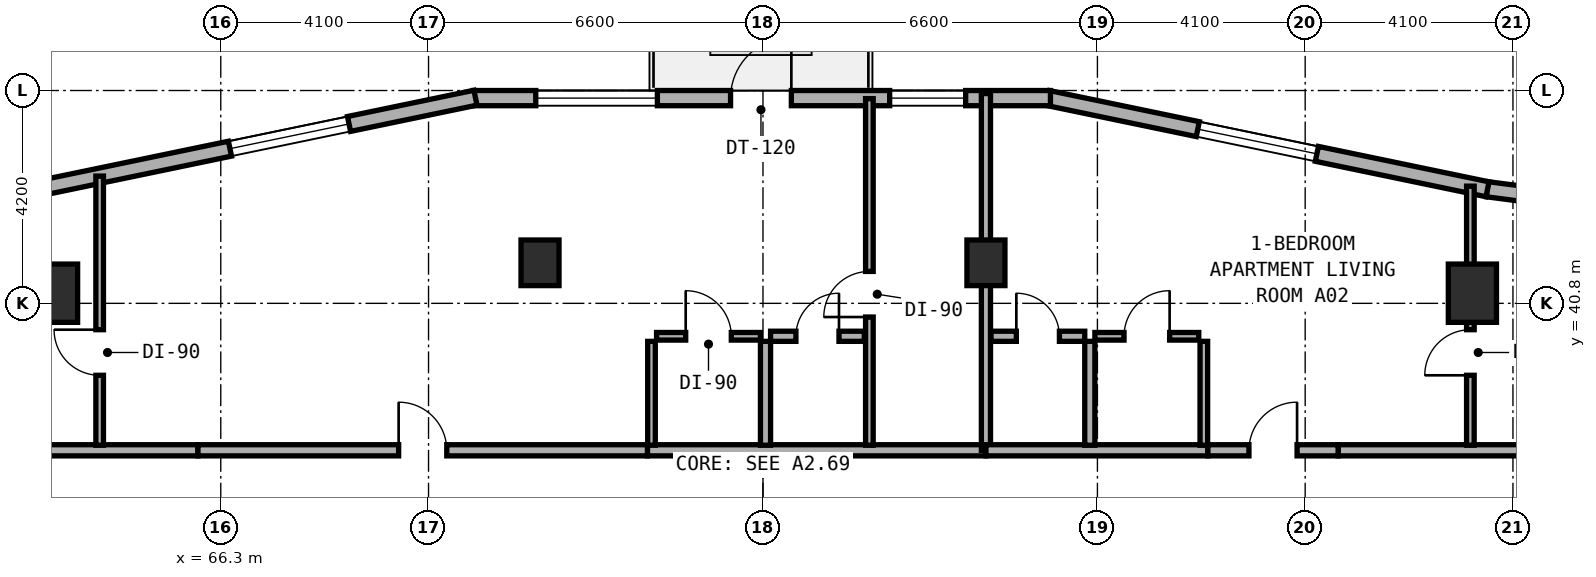
"""IFC4 building model, lengths in metres.
Left out: names, types, materials, properties, quantities, classifications, styles, units other than length and angle.
Written with IfcOpenShell. Run it as: python <this file> out.ifc"""

import sys

from ifc_helpers import new_model, si_unit, direction, frame, frame_2d, origin, origin_2d, place, context, subcontext, project, spatial, rectangle, extrude, element, fill, save


model = new_model("IFC4")
c1 = context("Model", 3, precision=1e-05, world=origin(), true_north=direction((0.0, 1.0)))
c2 = subcontext(c1, "Body", "Model", "MODEL_VIEW")
j1 = project(units=[si_unit("LENGTHUNIT", "METRE"), si_unit("PLANEANGLEUNIT", "RADIAN")], contexts=[c1])
p1 = place(None, origin())
s1 = spatial("IfcSite", under=j1, at=p1, CompositionType="ELEMENT")
p2 = place(p1, origin())
s2 = spatial("IfcBuilding", under=s1, at=p2, CompositionType="ELEMENT")
p3 = place(p2, frame((0.0, 0.0, 69.5)))
s3 = spatial("IfcBuildingStorey", under=s2, at=p3, CompositionType="ELEMENT", Elevation=69.5)
for number, where, z_axis, x_axis in (
    (1, (72.6, 41.6, 0.0), (0.0, 0.0, 1.0), (1.0, 0.0, 0.0)),
    (2, (81.4, 41.6, 0.0), (0.0, 0.0, 1.0), (1.0, 0.0, 0.0)),
):
    element("IfcColumn", number, at=place(p3, frame(where, z_axis=z_axis, x_axis=x_axis)), inside=s3, PredefinedType="COLUMN", context=c2, shape_type="SweptSolid", body=[
        extrude(rectangle(XDim=0.75, YDim=0.9, at=origin_2d()), origin(), (0.0, 0.0, 1.0), 3.5),
    ])
for number, where, z_axis, x_axis in (
    (3, (91.0, 41.0, 0.0), (0.0, 0.0, 1.0), (1.0, 0.0, 0.0)),
    (4, (63.0, 41.0, 0.0), (0.0, 0.0, 1.0), (1.0, 0.0, 0.0)),
):
    element("IfcColumn", number, at=place(p3, frame(where, z_axis=z_axis, x_axis=x_axis)), inside=s3, PredefinedType="COLUMN", context=c2, shape_type="SweptSolid", body=[
        extrude(rectangle(XDim=0.95, YDim=1.15, at=origin_2d()), origin(), (0.0, 0.0, 1.0), 3.5),
    ])
p4 = place(p3, frame((92.051, 42.953, 0.0), z_axis=(0.0, 0.0, 1.0), x_axis=(-0.991559404866, 0.129653178221, 0.0)))
e5 = element("IfcWall", 5, at=p4, inside=s3, PredefinedType="STANDARD", context=c2, shape_type="SweptSolid", body=[
    extrude(rectangle(XDim=0.764, YDim=0.3, at=frame_2d((0.382, 0.0))), origin(), (0.0, 0.0, 1.0), 3.25),
])
p5 = place(p3, frame((91.298, 43.051, 0.0), z_axis=(0.0, 0.0, 1.0), x_axis=(-0.979120793441, 0.203279295189, 0.0)))
e6 = element("IfcWall", 6, at=p5, inside=s3, PredefinedType="STANDARD", context=c2, shape_type="SweptSolid", body=[
    extrude(rectangle(XDim=8.855, YDim=0.3, at=frame_2d((4.427, 0.0))), origin(), (0.0, 0.0, 1.0), 3.25),
])
p6 = place(p5, frame((3.439, 0.0, 0.8)))
e7 = element("IfcOpeningElement", 7, at=p6, cuts=e6, PredefinedType="OPENING", context=c2, shape_type="SweptSolid", body=[
    extrude(rectangle(XDim=2.4, YDim=1.6, at=frame_2d((1.2, 0.8))), frame((0.0, 0.16, 0.0), z_axis=(0.0, -1.0, 0.0), x_axis=(1.0, 0.0, 0.0)), (0.0, 0.0, 1.0), 0.32),
])
p7 = place(p3, frame((82.673, 44.85, 0.0), z_axis=(0.0, 0.0, 1.0), x_axis=(-1.0, 0.0, 0.0)))
e8 = element("IfcWall", 8, at=p7, inside=s3, PredefinedType="STANDARD", context=c2, shape_type="SweptSolid", body=[
    extrude(rectangle(XDim=11.391, YDim=0.3, at=frame_2d((5.696, 0.0))), origin(), (0.0, 0.0, 1.0), 3.25),
])
p8 = place(p7, frame((5.113, 0.0, 0.0)))
e9 = element("IfcOpeningElement", 9, at=p8, cuts=e8, PredefinedType="OPENING", context=c2, shape_type="SweptSolid", body=[
    extrude(rectangle(XDim=1.2, YDim=2.15, at=frame_2d((0.6, 1.075))), frame((0.0, 0.16, 0.0), z_axis=(0.0, -1.0, 0.0), x_axis=(1.0, 0.0, 0.0)), (0.0, 0.0, 1.0), 0.32),
])
p9 = place(p7, frame((1.673, 0.0, 0.85)))
e10 = element("IfcOpeningElement", 10, at=p9, cuts=e8, PredefinedType="OPENING", context=c2, shape_type="SweptSolid", body=[
    extrude(rectangle(XDim=1.5, YDim=1.5, at=frame_2d((0.75, 0.75))), frame((0.0, 0.16, 0.0), z_axis=(0.0, -1.0, 0.0), x_axis=(1.0, 0.0, 0.0)), (0.0, 0.0, 1.0), 0.32),
])
p10 = place(p7, frame((7.757, 0.0, 0.8)))
e11 = element("IfcOpeningElement", 11, at=p10, cuts=e8, PredefinedType="OPENING", context=c2, shape_type="SweptSolid", body=[
    extrude(rectangle(XDim=2.4, YDim=1.6, at=frame_2d((1.2, 0.8))), frame((0.0, 0.16, 0.0), z_axis=(0.0, -1.0, 0.0), x_axis=(1.0, 0.0, 0.0)), (0.0, 0.0, 1.0), 0.32),
])
p11 = place(p3, frame((71.326, 44.858, 0.0), z_axis=(0.0, 0.0, 1.0), x_axis=(-0.979124350489, -0.203262161453, 0.0)))
e12 = element("IfcWall", 12, at=p11, inside=s3, PredefinedType="STANDARD", context=c2, shape_type="SweptSolid", body=[
    extrude(rectangle(XDim=8.889, YDim=0.3, at=frame_2d((4.445, 0.0))), origin(), (0.0, 0.0, 1.0), 3.25),
])
p12 = place(p11, frame((2.548, 0.0, 0.8)))
e13 = element("IfcOpeningElement", 13, at=p12, cuts=e12, PredefinedType="OPENING", context=c2, shape_type="SweptSolid", body=[
    extrude(rectangle(XDim=2.4, YDim=1.6, at=frame_2d((1.2, 0.8))), frame((0.0, 0.16, 0.0), z_axis=(0.0, -1.0, 0.0), x_axis=(1.0, 0.0, 0.0)), (0.0, 0.0, 1.0), 0.32),
])
p13 = place(p3, frame((58.16, 37.9, 0.0), z_axis=(0.0, 0.0, 1.0), x_axis=(1.0, 0.0, 0.0)))
e14 = element("IfcWall", 14, at=p13, inside=s3, PredefinedType="SOLIDWALL", context=c2, shape_type="SweptSolid", body=[
    extrude(rectangle(XDim=7.69, YDim=0.22, at=frame_2d((3.845, 0.0))), origin(), (0.0, 0.0, 1.0), 2.865),
])
p14 = place(p3, frame((74.72, 37.9, 0.0), z_axis=(0.0, 0.0, 1.0), x_axis=(1.0, 0.0, 0.0)))
e15 = element("IfcWall", 15, at=p14, inside=s3, PredefinedType="SOLIDWALL", context=c2, shape_type="SweptSolid", body=[
    extrude(rectangle(XDim=6.68, YDim=0.22, at=frame_2d((3.34, 0.0))), origin(), (0.0, 0.0, 1.0), 2.725),
])
p15 = place(p3, frame((65.85, 37.9, 0.0), z_axis=(0.0, 0.0, 1.0), x_axis=(1.0, 0.0, 0.0)))
e16 = element("IfcWall", 16, at=p15, inside=s3, PredefinedType="SOLIDWALL", context=c2, shape_type="SweptSolid", body=[
    extrude(rectangle(XDim=8.87, YDim=0.22, at=frame_2d((4.435, 0.0))), origin(), (0.0, 0.0, 1.0), 2.725),
])
p16 = place(p15, frame((3.96, 0.0, 0.0)))
e17 = element("IfcOpeningElement", 17, at=p16, cuts=e16, PredefinedType="OPENING", context=c2, shape_type="SweptSolid", body=[
    extrude(rectangle(XDim=0.95, YDim=2.1, at=frame_2d((0.475, 1.05))), frame((0.0, 0.12, 0.0), z_axis=(0.0, -1.0, 0.0), x_axis=(1.0, 0.0, 0.0)), (0.0, 0.0, 1.0), 0.24),
])
p17 = place(p3, frame((63.91, 38.0, 0.0), z_axis=(0.0, 0.0, 1.0), x_axis=(0.0, 1.0, 0.0)))
e18 = element("IfcWall", 18, at=p17, inside=s3, PredefinedType="PARTITIONING", context=c2, shape_type="SweptSolid", body=[
    extrude(rectangle(XDim=5.311, YDim=0.15, at=frame_2d((2.656, 0.0))), origin(), (0.0, 0.0, 1.0), 2.865),
])
p18 = place(p17, frame((1.38, 0.0, 0.0)))
e19 = element("IfcOpeningElement", 19, at=p18, cuts=e18, PredefinedType="OPENING", context=c2, shape_type="SweptSolid", body=[
    extrude(rectangle(XDim=0.9, YDim=2.1, at=frame_2d((0.45, 1.05))), frame((0.0, 0.085, 0.0), z_axis=(0.0, -1.0, 0.0), x_axis=(1.0, 0.0, 0.0)), (0.0, 0.0, 1.0), 0.17),
])
p19 = place(p3, frame((79.1, 38.0, 0.0), z_axis=(0.0, 0.0, 1.0), x_axis=(0.0, 1.0, 0.0)))
e20 = element("IfcWall", 20, at=p19, inside=s3, PredefinedType="PARTITIONING", context=c2, shape_type="SweptSolid", body=[
    extrude(rectangle(XDim=6.84, YDim=0.15, at=frame_2d((3.42, 0.0))), origin(), (0.0, 0.0, 1.0), 2.865),
])
p20 = place(p19, frame((2.53, 0.0, 0.0)))
e21 = element("IfcOpeningElement", 21, at=p20, cuts=e20, PredefinedType="OPENING", context=c2, shape_type="SweptSolid", body=[
    extrude(rectangle(XDim=0.9, YDim=2.1, at=frame_2d((0.45, 1.05))), frame((0.0, 0.085, 0.0), z_axis=(0.0, -1.0, 0.0), x_axis=(1.0, 0.0, 0.0)), (0.0, 0.0, 1.0), 0.17),
])
p21 = place(p3, frame((77.05, 38.0, 0.0), z_axis=(0.0, 0.0, 1.0), x_axis=(0.0, 1.0, 0.0)))
e22 = element("IfcWall", 22, at=p21, inside=s3, PredefinedType="PLUMBINGWALL", context=c2, shape_type="SweptSolid", body=[
    extrude(rectangle(XDim=2.05, YDim=0.2, at=frame_2d((1.025, 0.0))), origin(), (0.0, 0.0, 1.0), 2.955),
])
p22 = place(p3, frame((74.8, 38.0, 0.0), z_axis=(0.0, 0.0, 1.0), x_axis=(0.0, 1.0, 0.0)))
e23 = element("IfcWall", 23, at=p22, inside=s3, PredefinedType="PARTITIONING", context=c2, shape_type="SweptSolid", body=[
    extrude(rectangle(XDim=2.05, YDim=0.15, at=frame_2d((1.025, 0.0))), origin(), (0.0, 0.0, 1.0), 2.955),
])
p23 = place(p3, frame((77.15, 40.15, 0.0), z_axis=(0.0, 0.0, 1.0), x_axis=(1.0, 0.0, 0.0)))
e24 = element("IfcWall", 24, at=p23, inside=s3, PredefinedType="PLUMBINGWALL", context=c2, shape_type="SweptSolid", body=[
    extrude(rectangle(XDim=1.85, YDim=0.2, at=frame_2d((0.925, 0.0))), origin(), (0.0, 0.0, 1.0), 3.22),
])
p24 = place(p23, frame((0.5, 0.0, 0.0)))
e25 = element("IfcOpeningElement", 25, at=p24, cuts=e24, PredefinedType="OPENING", context=c2, shape_type="SweptSolid", body=[
    extrude(rectangle(XDim=0.85, YDim=2.1, at=frame_2d((0.425, 1.05))), frame((0.0, 0.11, 0.0), z_axis=(0.0, -1.0, 0.0), x_axis=(1.0, 0.0, 0.0)), (0.0, 0.0, 1.0), 0.22),
])
p25 = place(p3, frame((74.9, 40.15, 0.0), z_axis=(0.0, 0.0, 1.0), x_axis=(1.0, 0.0, 0.0)))
e26 = element("IfcWall", 26, at=p25, inside=s3, PredefinedType="PARTITIONING", context=c2, shape_type="SweptSolid", body=[
    extrude(rectangle(XDim=2.05, YDim=0.15, at=frame_2d((1.025, 0.0))), origin(), (0.0, 0.0, 1.0), 3.22),
])
p26 = place(p25, frame((0.575, 0.0, 0.0)))
e27 = element("IfcOpeningElement", 27, at=p26, cuts=e26, PredefinedType="OPENING", context=c2, shape_type="SweptSolid", body=[
    extrude(rectangle(XDim=0.9, YDim=2.1, at=frame_2d((0.45, 1.05))), frame((0.0, 0.085, 0.0), z_axis=(0.0, -1.0, 0.0), x_axis=(1.0, 0.0, 0.0)), (0.0, 0.0, 1.0), 0.17),
])
p27 = place(p3, frame((81.4, 37.9, 0.0), z_axis=(0.0, 0.0, 1.0), x_axis=(0.0, 1.0, 0.0)))
e28 = element("IfcWall", 28, at=p27, inside=s3, PredefinedType="SOLIDWALL", context=c2, shape_type="SweptSolid", body=[
    extrude(rectangle(XDim=7.04, YDim=0.18, at=frame_2d((3.52, 0.0))), origin(), (0.0, 0.0, 1.0), 2.725),
])
p28 = place(p3, frame((81.4, 37.9, 0.0), z_axis=(0.0, 0.0, 1.0), x_axis=(1.0, 0.0, 0.0)))
e29 = element("IfcWall", 29, at=p28, inside=s3, PredefinedType="SOLIDWALL", context=c2, shape_type="SweptSolid", body=[
    extrude(rectangle(XDim=4.38, YDim=0.22, at=frame_2d((2.19, 0.0))), origin(), (0.0, 0.0, 1.0), 2.725),
])
p29 = place(p3, frame((88.35, 37.9, 0.0), z_axis=(0.0, 0.0, 1.0), x_axis=(1.0, 0.0, 0.0)))
e30 = element("IfcWall", 30, at=p29, inside=s3, PredefinedType="SOLIDWALL", context=c2, shape_type="SweptSolid", body=[
    extrude(rectangle(XDim=7.41, YDim=0.22, at=frame_2d((3.705, 0.0))), origin(), (0.0, 0.0, 1.0), 2.865),
])
p30 = place(p3, frame((85.78, 37.9, 0.0), z_axis=(0.0, 0.0, 1.0), x_axis=(1.0, 0.0, 0.0)))
e31 = element("IfcWall", 31, at=p30, inside=s3, PredefinedType="SOLIDWALL", context=c2, shape_type="SweptSolid", body=[
    extrude(rectangle(XDim=2.57, YDim=0.22, at=frame_2d((1.285, 0.0))), origin(), (0.0, 0.0, 1.0), 3.22),
])
p31 = place(p30, frame((0.81, 0.0, 0.0)))
e32 = element("IfcOpeningElement", 32, at=p31, cuts=e31, PredefinedType="OPENING", context=c2, shape_type="SweptSolid", body=[
    extrude(rectangle(XDim=0.95, YDim=2.1, at=frame_2d((0.475, 1.05))), frame((0.0, 0.12, 0.0), z_axis=(0.0, -1.0, 0.0), x_axis=(1.0, 0.0, 0.0)), (0.0, 0.0, 1.0), 0.24),
])
p32 = place(p3, frame((90.96, 38.0, 0.0), z_axis=(0.0, 0.0, 1.0), x_axis=(0.0, 1.0, 0.0)))
e33 = element("IfcWall", 33, at=p32, inside=s3, PredefinedType="PARTITIONING", context=c2, shape_type="SweptSolid", body=[
    extrude(rectangle(XDim=5.113, YDim=0.15, at=frame_2d((2.557, 0.0))), origin(), (0.0, 0.0, 1.0), 2.865),
])
p33 = place(p32, frame((1.38, 0.0, 0.0)))
e34 = element("IfcOpeningElement", 34, at=p33, cuts=e33, PredefinedType="OPENING", context=c2, shape_type="SweptSolid", body=[
    extrude(rectangle(XDim=0.9, YDim=2.1, at=frame_2d((0.45, 1.05))), frame((0.0, 0.085, 0.0), z_axis=(0.0, -1.0, 0.0), x_axis=(1.0, 0.0, 0.0)), (0.0, 0.0, 1.0), 0.17),
])
p34 = place(p3, frame((83.45, 38.0, 0.0), z_axis=(0.0, 0.0, 1.0), x_axis=(0.0, 1.0, 0.0)))
e35 = element("IfcWall", 35, at=p34, inside=s3, PredefinedType="PLUMBINGWALL", context=c2, shape_type="SweptSolid", body=[
    extrude(rectangle(XDim=2.05, YDim=0.2, at=frame_2d((1.025, 0.0))), origin(), (0.0, 0.0, 1.0), 3.22),
])
p35 = place(p3, frame((85.7, 38.0, 0.0), z_axis=(0.0, 0.0, 1.0), x_axis=(0.0, 1.0, 0.0)))
e36 = element("IfcWall", 36, at=p35, inside=s3, PredefinedType="PARTITIONING", context=c2, shape_type="SweptSolid", body=[
    extrude(rectangle(XDim=2.05, YDim=0.15, at=frame_2d((1.025, 0.0))), origin(), (0.0, 0.0, 1.0), 3.22),
])
p36 = place(p3, frame((81.5, 40.15, 0.0), z_axis=(0.0, 0.0, 1.0), x_axis=(1.0, 0.0, 0.0)))
e37 = element("IfcWall", 37, at=p36, inside=s3, PredefinedType="PLUMBINGWALL", context=c2, shape_type="SweptSolid", body=[
    extrude(rectangle(XDim=1.85, YDim=0.2, at=frame_2d((0.925, 0.0))), origin(), (0.0, 0.0, 1.0), 2.725),
])
p37 = place(p36, frame((0.5, 0.0, 0.0)))
e38 = element("IfcOpeningElement", 38, at=p37, cuts=e37, PredefinedType="OPENING", context=c2, shape_type="SweptSolid", body=[
    extrude(rectangle(XDim=0.85, YDim=2.1, at=frame_2d((0.425, 1.05))), frame((0.0, 0.11, 0.0), z_axis=(0.0, -1.0, 0.0), x_axis=(1.0, 0.0, 0.0)), (0.0, 0.0, 1.0), 0.22),
])
p38 = place(p3, frame((83.55, 40.15, 0.0), z_axis=(0.0, 0.0, 1.0), x_axis=(1.0, 0.0, 0.0)))
e39 = element("IfcWall", 39, at=p38, inside=s3, PredefinedType="PARTITIONING", context=c2, shape_type="SweptSolid", body=[
    extrude(rectangle(XDim=2.05, YDim=0.15, at=frame_2d((1.025, 0.0))), origin(), (0.0, 0.0, 1.0), 3.22),
])
p39 = place(p38, frame((0.575, 0.0, 0.0)))
e40 = element("IfcOpeningElement", 40, at=p39, cuts=e39, PredefinedType="OPENING", context=c2, shape_type="SweptSolid", body=[
    extrude(rectangle(XDim=0.9, YDim=2.1, at=frame_2d((0.45, 1.05))), frame((0.0, 0.085, 0.0), z_axis=(0.0, -1.0, 0.0), x_axis=(1.0, 0.0, 0.0)), (0.0, 0.0, 1.0), 0.17),
])
p40 = place(p6, origin())
e41 = element("IfcWindow", 41, at=p40, inside=s3, PartitioningType="SINGLE_PANEL", PredefinedType="WINDOW", context=c2, shape_type="SweptSolid", body=[
    extrude(rectangle(XDim=2.4, YDim=1.6, at=frame_2d((1.2, 0.8))), frame((0.0, 0.03, 0.0), z_axis=(0.0, -1.0, 0.0), x_axis=(1.0, 0.0, 0.0)), (0.0, 0.0, 1.0), 0.06),
])
fill(e7, e41)
p41 = place(p8, frame((1.2, 0.0, 0.0), z_axis=(0.0, 0.0, 1.0), x_axis=(-1.0, 0.0, 0.0)))
e42 = element("IfcDoor", 42, at=p41, inside=s3, OperationType="SINGLE_SWING_RIGHT", PredefinedType="DOOR", context=c2, shape_type="SweptSolid", body=[
    extrude(rectangle(XDim=1.2, YDim=2.15, at=frame_2d((0.6, 1.075))), frame((0.0, 0.025, 0.0), z_axis=(0.0, -1.0, 0.0), x_axis=(1.0, 0.0, 0.0)), (0.0, 0.0, 1.0), 0.05),
])
fill(e9, e42)
p42 = place(p9, origin())
e43 = element("IfcWindow", 43, at=p42, inside=s3, PartitioningType="SINGLE_PANEL", PredefinedType="WINDOW", context=c2, shape_type="SweptSolid", body=[
    extrude(rectangle(XDim=1.5, YDim=1.5, at=frame_2d((0.75, 0.75))), frame((0.0, 0.03, 0.0), z_axis=(0.0, -1.0, 0.0), x_axis=(1.0, 0.0, 0.0)), (0.0, 0.0, 1.0), 0.06),
])
fill(e10, e43)
p43 = place(p10, origin())
e44 = element("IfcWindow", 44, at=p43, inside=s3, PartitioningType="SINGLE_PANEL", PredefinedType="WINDOW", context=c2, shape_type="SweptSolid", body=[
    extrude(rectangle(XDim=2.4, YDim=1.6, at=frame_2d((1.2, 0.8))), frame((0.0, 0.03, 0.0), z_axis=(0.0, -1.0, 0.0), x_axis=(1.0, 0.0, 0.0)), (0.0, 0.0, 1.0), 0.06),
])
fill(e11, e44)
p44 = place(p12, origin())
e45 = element("IfcWindow", 45, at=p44, inside=s3, PartitioningType="SINGLE_PANEL", PredefinedType="WINDOW", context=c2, shape_type="SweptSolid", body=[
    extrude(rectangle(XDim=2.4, YDim=1.6, at=frame_2d((1.2, 0.8))), frame((0.0, 0.03, 0.0), z_axis=(0.0, -1.0, 0.0), x_axis=(1.0, 0.0, 0.0)), (0.0, 0.0, 1.0), 0.06),
])
fill(e13, e45)
p45 = place(p16, origin())
e46 = element("IfcDoor", 46, at=p45, inside=s3, OperationType="SINGLE_SWING_LEFT", PredefinedType="DOOR", context=c2, shape_type="SweptSolid", body=[
    extrude(rectangle(XDim=0.95, YDim=2.1, at=frame_2d((0.475, 1.05))), frame((0.0, 0.025, 0.0), z_axis=(0.0, -1.0, 0.0), x_axis=(1.0, 0.0, 0.0)), (0.0, 0.0, 1.0), 0.05),
])
fill(e17, e46)
p46 = place(p18, origin())
e47 = element("IfcDoor", 47, at=p46, inside=s3, OperationType="SINGLE_SWING_RIGHT", PredefinedType="DOOR", context=c2, shape_type="SweptSolid", body=[
    extrude(rectangle(XDim=0.9, YDim=2.1, at=frame_2d((0.45, 1.05))), frame((0.0, 0.025, 0.0), z_axis=(0.0, -1.0, 0.0), x_axis=(1.0, 0.0, 0.0)), (0.0, 0.0, 1.0), 0.05),
])
fill(e19, e47)
p47 = place(p20, origin())
e48 = element("IfcDoor", 48, at=p47, inside=s3, OperationType="SINGLE_SWING_LEFT", PredefinedType="DOOR", context=c2, shape_type="SweptSolid", body=[
    extrude(rectangle(XDim=0.9, YDim=2.1, at=frame_2d((0.45, 1.05))), frame((0.0, 0.025, 0.0), z_axis=(0.0, -1.0, 0.0), x_axis=(1.0, 0.0, 0.0)), (0.0, 0.0, 1.0), 0.05),
])
fill(e21, e48)
p48 = place(p24, origin())
e49 = element("IfcDoor", 49, at=p48, inside=s3, OperationType="SINGLE_SWING_RIGHT", PredefinedType="DOOR", context=c2, shape_type="SweptSolid", body=[
    extrude(rectangle(XDim=0.85, YDim=2.1, at=frame_2d((0.425, 1.05))), frame((0.0, 0.025, 0.0), z_axis=(0.0, -1.0, 0.0), x_axis=(1.0, 0.0, 0.0)), (0.0, 0.0, 1.0), 0.05),
])
fill(e25, e49)
p49 = place(p26, origin())
e50 = element("IfcDoor", 50, at=p49, inside=s3, OperationType="SINGLE_SWING_LEFT", PredefinedType="DOOR", context=c2, shape_type="SweptSolid", body=[
    extrude(rectangle(XDim=0.9, YDim=2.1, at=frame_2d((0.45, 1.05))), frame((0.0, 0.025, 0.0), z_axis=(0.0, -1.0, 0.0), x_axis=(1.0, 0.0, 0.0)), (0.0, 0.0, 1.0), 0.05),
])
fill(e27, e50)
p50 = place(p31, origin())
e51 = element("IfcDoor", 51, at=p50, inside=s3, OperationType="SINGLE_SWING_RIGHT", PredefinedType="DOOR", context=c2, shape_type="SweptSolid", body=[
    extrude(rectangle(XDim=0.95, YDim=2.1, at=frame_2d((0.475, 1.05))), frame((0.0, 0.025, 0.0), z_axis=(0.0, -1.0, 0.0), x_axis=(1.0, 0.0, 0.0)), (0.0, 0.0, 1.0), 0.05),
])
fill(e32, e51)
p51 = place(p33, origin())
e52 = element("IfcDoor", 52, at=p51, inside=s3, OperationType="SINGLE_SWING_LEFT", PredefinedType="DOOR", context=c2, shape_type="SweptSolid", body=[
    extrude(rectangle(XDim=0.9, YDim=2.1, at=frame_2d((0.45, 1.05))), frame((0.0, 0.025, 0.0), z_axis=(0.0, -1.0, 0.0), x_axis=(1.0, 0.0, 0.0)), (0.0, 0.0, 1.0), 0.05),
])
fill(e34, e52)
p52 = place(p37, origin())
e53 = element("IfcDoor", 53, at=p52, inside=s3, OperationType="SINGLE_SWING_LEFT", PredefinedType="DOOR", context=c2, shape_type="SweptSolid", body=[
    extrude(rectangle(XDim=0.85, YDim=2.1, at=frame_2d((0.425, 1.05))), frame((0.0, 0.025, 0.0), z_axis=(0.0, -1.0, 0.0), x_axis=(1.0, 0.0, 0.0)), (0.0, 0.0, 1.0), 0.05),
])
fill(e38, e53)
p53 = place(p39, origin())
e54 = element("IfcDoor", 54, at=p53, inside=s3, OperationType="SINGLE_SWING_RIGHT", PredefinedType="DOOR", context=c2, shape_type="SweptSolid", body=[
    extrude(rectangle(XDim=0.9, YDim=2.1, at=frame_2d((0.45, 1.05))), frame((0.0, 0.025, 0.0), z_axis=(0.0, -1.0, 0.0), x_axis=(1.0, 0.0, 0.0)), (0.0, 0.0, 1.0), 0.05),
])
fill(e40, e54)
save(model, sys.argv[1])
